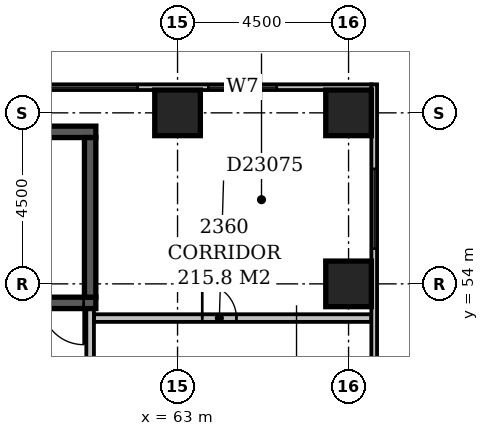
"""IFC4 building model, lengths in metres.
Left out: names, types, materials, properties, quantities, classifications, styles, units other than length and angle.
Written with IfcOpenShell. Run it as: python <this file> out.ifc"""

import sys

from ifc_helpers import new_model, si_unit, direction, frame, frame_2d, origin, origin_2d, place, context, subcontext, project, spatial, rectangle, extrude, element, fill, save


model = new_model("IFC4")
c1 = context("Model", 3, precision=1e-05, world=origin(), true_north=direction((0.0, 1.0)))
c2 = subcontext(c1, "Body", "Model", "MODEL_VIEW")
j1 = project(units=[si_unit("LENGTHUNIT", "METRE"), si_unit("PLANEANGLEUNIT", "RADIAN")], contexts=[c1])
p1 = place(None, origin())
s1 = spatial("IfcSite", under=j1, at=p1, CompositionType="ELEMENT")
p2 = place(p1, origin())
s2 = spatial("IfcBuilding", under=s1, at=p2, CompositionType="ELEMENT")
p3 = place(p2, frame((0.0, 0.0, 93.8)))
s3 = spatial("IfcBuildingStorey", under=s2, at=p3, CompositionType="ELEMENT", Elevation=93.8)
p4 = place(p3, frame((53.85, 53.5, -0.3), z_axis=(0.0, 0.0, 1.0), x_axis=(1.0, 0.0, 0.0)))
e1 = element("IfcWall", 1, at=p4, inside=s3, PredefinedType="SHEAR", context=c2, shape_type="SweptSolid", body=[
    extrude(rectangle(XDim=7.0, YDim=0.3, at=frame_2d((3.5, 0.0))), origin(), (0.0, 0.0, 1.0), 3.6),
])
p5 = place(p4, frame((5.58, 0.0, 0.3)))
e2 = element("IfcOpeningElement", 2, at=p5, cuts=e1, PredefinedType="OPENING", context=c2, shape_type="SweptSolid", body=[
    extrude(rectangle(XDim=1.1, YDim=2.1, at=frame_2d((0.55, 1.05))), frame((0.0, 0.162, 0.0), z_axis=(0.0, -1.0, 0.0), x_axis=(1.0, 0.0, 0.0)), (0.0, 0.0, 1.0), 0.324),
])
p6 = place(p3, frame((53.85, 58.0, -0.3), z_axis=(0.0, 0.0, 1.0), x_axis=(1.0, 0.0, 0.0)))
e3 = element("IfcWall", 3, at=p6, inside=s3, PredefinedType="SHEAR", context=c2, shape_type="SweptSolid", body=[
    extrude(rectangle(XDim=7.0, YDim=0.3, at=frame_2d((3.5, 0.0))), origin(), (0.0, 0.0, 1.0), 3.6),
])
p7 = place(p3, frame((60.7, 53.65, -0.3), z_axis=(0.0, 0.0, 1.0), x_axis=(0.0, 1.0, 0.0)))
e4 = element("IfcWall", 4, at=p7, inside=s3, PredefinedType="SHEAR", context=c2, shape_type="SweptSolid", body=[
    extrude(rectangle(XDim=4.2, YDim=0.3, at=frame_2d((2.1, 0.0))), origin(), (0.0, 0.0, 1.0), 3.6),
])
for number, where, z_axis, x_axis in (
    (5, (67.5, 54.0, -0.3), (0.0, 0.0, 1.0), (1.0, 0.0, 0.0)),
    (6, (63.0, 58.5, -0.3), (0.0, 0.0, 1.0), (1.0, 0.0, 0.0)),
    (7, (67.5, 58.5, -0.3), (0.0, 0.0, 1.0), (1.0, 0.0, 0.0)),
):
    element("IfcColumn", number, at=place(p3, frame(where, z_axis=z_axis, x_axis=x_axis)), inside=s3, PredefinedType="COLUMN", context=c2, shape_type="SweptSolid", body=[
        extrude(rectangle(XDim=1.2, YDim=1.2, at=origin_2d()), origin(), (0.0, 0.0, 1.0), 3.6),
    ])
p8 = place(p3, frame((68.175, 35.4, 0.0), z_axis=(0.0, 0.0, 1.0), x_axis=(0.0, 1.0, 0.0)))
e8 = element("IfcWall", 8, at=p8, inside=s3, PredefinedType="STANDARD", context=c2, shape_type="SweptSolid", body=[
    extrude(rectangle(XDim=23.85, YDim=0.15, at=frame_2d((11.925, 0.0))), origin(), (0.0, 0.0, 1.0), 2.7),
])
p9 = place(p8, frame((2.49, 0.0, 0.6)))
e9 = element("IfcOpeningElement", 9, at=p9, cuts=e8, PredefinedType="OPENING", context=c2, shape_type="SweptSolid", body=[
    extrude(rectangle(XDim=1.8, YDim=1.8, at=frame_2d((0.9, 0.9))), frame((0.0, 0.087, 0.0), z_axis=(0.0, -1.0, 0.0), x_axis=(1.0, 0.0, 0.0)), (0.0, 0.0, 1.0), 0.174),
])
p10 = place(p8, frame((10.65, 0.0, 0.6)))
e10 = element("IfcOpeningElement", 10, at=p10, cuts=e8, PredefinedType="OPENING", context=c2, shape_type="SweptSolid", body=[
    extrude(rectangle(XDim=2.4, YDim=1.8, at=frame_2d((1.2, 0.9))), frame((0.0, 0.087, 0.0), z_axis=(0.0, -1.0, 0.0), x_axis=(1.0, 0.0, 0.0)), (0.0, 0.0, 1.0), 0.174),
])
p11 = place(p8, frame((19.526, 0.0, 0.6)))
e11 = element("IfcOpeningElement", 11, at=p11, cuts=e8, PredefinedType="OPENING", context=c2, shape_type="SweptSolid", body=[
    extrude(rectangle(XDim=2.1, YDim=1.8, at=frame_2d((1.05, 0.9))), frame((0.0, 0.087, 0.0), z_axis=(0.0, -1.0, 0.0), x_axis=(1.0, 0.0, 0.0)), (0.0, 0.0, 1.0), 0.174),
])
p12 = place(p3, frame((68.1, 59.175, 0.0), z_axis=(0.0, 0.0, 1.0), x_axis=(-1.0, 0.0, 0.0)))
e12 = element("IfcWall", 12, at=p12, inside=s3, PredefinedType="STANDARD", context=c2, shape_type="SweptSolid", body=[
    extrude(rectangle(XDim=68.85, YDim=0.15, at=frame_2d((34.425, 0.0))), origin(), (0.0, 0.0, 1.0), 2.7),
])
p13 = place(p12, frame((2.49, 0.0, 0.6)))
e13 = element("IfcOpeningElement", 13, at=p13, cuts=e12, PredefinedType="OPENING", context=c2, shape_type="SweptSolid", body=[
    extrude(rectangle(XDim=1.8, YDim=1.8, at=frame_2d((0.9, 0.9))), frame((0.0, 0.087, 0.0), z_axis=(0.0, -1.0, 0.0), x_axis=(1.0, 0.0, 0.0)), (0.0, 0.0, 1.0), 0.174),
])
p14 = place(p12, frame((6.15, 0.0, 0.6)))
e14 = element("IfcOpeningElement", 14, at=p14, cuts=e12, PredefinedType="OPENING", context=c2, shape_type="SweptSolid", body=[
    extrude(rectangle(XDim=2.4, YDim=1.8, at=frame_2d((1.2, 0.9))), frame((0.0, 0.087, 0.0), z_axis=(0.0, -1.0, 0.0), x_axis=(1.0, 0.0, 0.0)), (0.0, 0.0, 1.0), 0.174),
])
p15 = place(p3, frame((60.7, 51.6, 0.0), z_axis=(0.0, 0.0, 1.0), x_axis=(0.0, 1.0, 0.0)))
e15 = element("IfcWall", 15, at=p15, inside=s3, PredefinedType="PARTITIONING", context=c2, shape_type="SweptSolid", body=[
    extrude(rectangle(XDim=1.73, YDim=0.2, at=frame_2d((0.865, 0.0))), origin(), (0.0, 0.0, 1.0), 3.3),
])
p16 = place(p3, frame((60.8, 53.1, 0.0), z_axis=(0.0, 0.0, 1.0), x_axis=(1.0, 0.0, 0.0)))
e16 = element("IfcWall", 16, at=p16, inside=s3, PredefinedType="PARTITIONING", context=c2, shape_type="SweptSolid", body=[
    extrude(rectangle(XDim=7.3, YDim=0.2, at=frame_2d((3.65, 0.0))), origin(), (0.0, 0.0, 1.0), 3.3),
])
p17 = place(p16, frame((2.85, 0.0, 0.0)))
e17 = element("IfcOpeningElement", 17, at=p17, cuts=e16, PredefinedType="OPENING", context=c2, shape_type="SweptSolid", body=[
    extrude(rectangle(XDim=0.9, YDim=2.1, at=frame_2d((0.45, 1.05))), frame((0.0, 0.112, 0.0), z_axis=(0.0, -1.0, 0.0), x_axis=(1.0, 0.0, 0.0)), (0.0, 0.0, 1.0), 0.224),
])
p18 = place(p11, origin())
e18 = element("IfcWindow", 18, at=p18, inside=s3, PartitioningType="SINGLE_PANEL", PredefinedType="WINDOW", context=c2, shape_type="SweptSolid", body=[
    extrude(rectangle(XDim=2.1, YDim=1.8, at=frame_2d((1.05, 0.9))), frame((0.0, 0.03, 0.0), z_axis=(0.0, -1.0, 0.0), x_axis=(1.0, 0.0, 0.0)), (0.0, 0.0, 1.0), 0.06),
])
fill(e11, e18)
p19 = place(p13, origin())
e19 = element("IfcWindow", 19, at=p19, inside=s3, PartitioningType="SINGLE_PANEL", PredefinedType="WINDOW", context=c2, shape_type="SweptSolid", body=[
    extrude(rectangle(XDim=1.8, YDim=1.8, at=frame_2d((0.9, 0.9))), frame((0.0, 0.03, 0.0), z_axis=(0.0, -1.0, 0.0), x_axis=(1.0, 0.0, 0.0)), (0.0, 0.0, 1.0), 0.06),
])
fill(e13, e19)
p20 = place(p14, origin())
e20 = element("IfcWindow", 20, at=p20, inside=s3, PartitioningType="SINGLE_PANEL", PredefinedType="WINDOW", context=c2, shape_type="SweptSolid", body=[
    extrude(rectangle(XDim=2.4, YDim=1.8, at=frame_2d((1.2, 0.9))), frame((0.0, 0.03, 0.0), z_axis=(0.0, -1.0, 0.0), x_axis=(1.0, 0.0, 0.0)), (0.0, 0.0, 1.0), 0.06),
])
fill(e14, e20)
p21 = place(p5, origin())
e21 = element("IfcDoor", 21, at=p21, inside=s3, OperationType="SINGLE_SWING_RIGHT", PredefinedType="DOOR", context=c2, shape_type="SweptSolid", body=[
    extrude(rectangle(XDim=1.1, YDim=2.1, at=frame_2d((0.55, 1.05))), frame((0.0, 0.025, 0.0), z_axis=(0.0, -1.0, 0.0), x_axis=(1.0, 0.0, 0.0)), (0.0, 0.0, 1.0), 0.05),
])
fill(e2, e21)
p22 = place(p17, origin())
e22 = element("IfcDoor", 22, at=p22, inside=s3, OperationType="SINGLE_SWING_LEFT", PredefinedType="DOOR", context=c2, shape_type="SweptSolid", body=[
    extrude(rectangle(XDim=0.9, YDim=2.1, at=frame_2d((0.45, 1.05))), frame((0.0, 0.025, 0.0), z_axis=(0.0, -1.0, 0.0), x_axis=(1.0, 0.0, 0.0)), (0.0, 0.0, 1.0), 0.05),
])
fill(e17, e22)
save(model, sys.argv[1])
